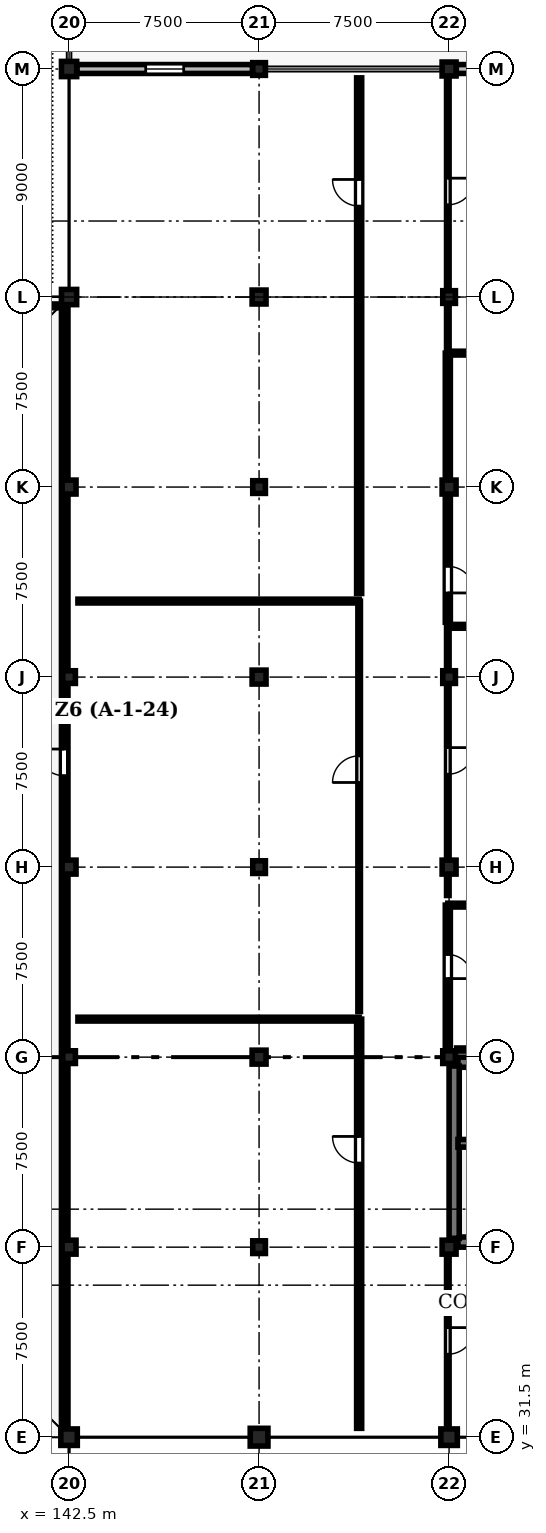
"""IFC4 building model, lengths in metres.
Left out: names, types, materials, properties, quantities, classifications, styles, units other than length and angle.
Written with IfcOpenShell. Run it as: python <this file> out.ifc"""

import sys

from ifc_helpers import new_model, si_unit, direction, frame, frame_2d, origin, origin_2d, place, context, subcontext, project, spatial, rectangle, circle, extrude, element, fill, save


model = new_model("IFC4")
c1 = context("Model", 3, precision=1e-05, world=origin(), true_north=direction((0.0, 1.0)))
c2 = subcontext(c1, "Body", "Model", "MODEL_VIEW")
j1 = project(units=[si_unit("LENGTHUNIT", "METRE"), si_unit("PLANEANGLEUNIT", "RADIAN")], contexts=[c1])
p1 = place(None, origin())
s1 = spatial("IfcSite", under=j1, at=p1, CompositionType="ELEMENT")
p2 = place(p1, origin())
s2 = spatial("IfcBuilding", under=s1, at=p2, CompositionType="ELEMENT")
p3 = place(p2, frame((0.0, 0.0, 4.8)))
s3 = spatial("IfcBuildingStorey", under=s2, at=p3, CompositionType="ELEMENT", Elevation=4.8)
p4 = place(p3, frame((142.5, 31.5, 0.0), z_axis=(0.0, 0.0, 1.0), x_axis=(1.0, 0.0, 0.0)))
e1 = element("IfcColumn", 1, at=p4, inside=s3, PredefinedType="COLUMN", context=c2, shape_type="SweptSolid", body=[
    extrude(rectangle(XDim=0.65, YDim=0.65, at=origin_2d()), origin(), (0.0, 0.0, 1.0), 4.5),
])
p5 = place(p3, frame((142.5, 39.0, 0.0), z_axis=(0.0, 0.0, 1.0), x_axis=(1.0, 0.0, 0.0)))
e2 = element("IfcColumn", 2, at=p5, inside=s3, PredefinedType="COLUMN", context=c2, shape_type="SweptSolid", body=[
    extrude(rectangle(XDim=0.55, YDim=0.55, at=origin_2d()), origin(), (0.0, 0.0, 1.0), 4.5),
])
p6 = place(p3, frame((142.5, 46.5, 0.0), z_axis=(0.0, 0.0, 1.0), x_axis=(1.0, 0.0, 0.0)))
e3 = element("IfcColumn", 3, at=p6, inside=s3, PredefinedType="COLUMN", context=c2, shape_type="SweptSolid", body=[
    extrude(rectangle(XDim=0.5, YDim=0.5, at=origin_2d()), origin(), (0.0, 0.0, 1.0), 4.5),
])
p7 = place(p3, frame((142.5, 54.0, 0.0), z_axis=(0.0, 0.0, 1.0), x_axis=(1.0, 0.0, 0.0)))
e4 = element("IfcColumn", 4, at=p7, inside=s3, PredefinedType="COLUMN", context=c2, shape_type="SweptSolid", body=[
    extrude(rectangle(XDim=0.55, YDim=0.55, at=origin_2d()), origin(), (0.0, 0.0, 1.0), 4.5),
])
p8 = place(p3, frame((142.5, 61.5, 0.0), z_axis=(0.0, 0.0, 1.0), x_axis=(1.0, 0.0, 0.0)))
e5 = element("IfcColumn", 5, at=p8, inside=s3, PredefinedType="COLUMN", context=c2, shape_type="SweptSolid", body=[
    extrude(rectangle(XDim=0.5, YDim=0.5, at=origin_2d()), origin(), (0.0, 0.0, 1.0), 4.5),
])
p9 = place(p3, frame((142.5, 69.0, 0.0), z_axis=(0.0, 0.0, 1.0), x_axis=(1.0, 0.0, 0.0)))
e6 = element("IfcColumn", 6, at=p9, inside=s3, PredefinedType="COLUMN", context=c2, shape_type="SweptSolid", body=[
    extrude(rectangle(XDim=0.55, YDim=0.55, at=origin_2d()), origin(), (0.0, 0.0, 1.0), 4.5),
])
p10 = place(p3, frame((142.5, 76.5, 0.0), z_axis=(0.0, 0.0, 1.0), x_axis=(1.0, 0.0, 0.0)))
e7 = element("IfcColumn", 7, at=p10, inside=s3, PredefinedType="COLUMN", context=c2, shape_type="SweptSolid", body=[
    extrude(rectangle(XDim=0.6, YDim=0.6, at=origin_2d()), origin(), (0.0, 0.0, 1.0), 4.5),
])
p11 = place(p3, frame((142.5, 85.5, 0.0), z_axis=(0.0, 0.0, 1.0), x_axis=(1.0, 0.0, 0.0)))
e8 = element("IfcColumn", 8, at=p11, inside=s3, PredefinedType="COLUMN", context=c2, shape_type="SweptSolid", body=[
    extrude(circle(Radius=0.3, at=origin_2d()), origin(), (0.0, 0.0, 1.0), 4.5),
])
p12 = place(p3, frame((150.0, 31.5, 0.0), z_axis=(0.0, 0.0, 1.0), x_axis=(1.0, 0.0, 0.0)))
e9 = element("IfcColumn", 9, at=p12, inside=s3, PredefinedType="COLUMN", context=c2, shape_type="SweptSolid", body=[
    extrude(rectangle(XDim=0.7, YDim=0.7, at=origin_2d()), origin(), (0.0, 0.0, 1.0), 4.5),
])
p13 = place(p3, frame((150.0, 39.0, 0.0), z_axis=(0.0, 0.0, 1.0), x_axis=(1.0, 0.0, 0.0)))
e10 = element("IfcColumn", 10, at=p13, inside=s3, PredefinedType="COLUMN", context=c2, shape_type="SweptSolid", body=[
    extrude(rectangle(XDim=0.5, YDim=0.5, at=origin_2d()), origin(), (0.0, 0.0, 1.0), 4.5),
])
p14 = place(p3, frame((150.0, 46.5, 0.0), z_axis=(0.0, 0.0, 1.0), x_axis=(1.0, 0.0, 0.0)))
e11 = element("IfcColumn", 11, at=p14, inside=s3, PredefinedType="COLUMN", context=c2, shape_type="SweptSolid", body=[
    extrude(rectangle(XDim=0.55, YDim=0.55, at=origin_2d()), origin(), (0.0, 0.0, 1.0), 4.5),
])
p15 = place(p3, frame((150.0, 54.0, 0.0), z_axis=(0.0, 0.0, 1.0), x_axis=(1.0, 0.0, 0.0)))
e12 = element("IfcColumn", 12, at=p15, inside=s3, PredefinedType="COLUMN", context=c2, shape_type="SweptSolid", body=[
    extrude(rectangle(XDim=0.5, YDim=0.5, at=origin_2d()), origin(), (0.0, 0.0, 1.0), 4.5),
])
p16 = place(p3, frame((150.0, 61.5, 0.0), z_axis=(0.0, 0.0, 1.0), x_axis=(1.0, 0.0, 0.0)))
e13 = element("IfcColumn", 13, at=p16, inside=s3, PredefinedType="COLUMN", context=c2, shape_type="SweptSolid", body=[
    extrude(rectangle(XDim=0.55, YDim=0.55, at=origin_2d()), origin(), (0.0, 0.0, 1.0), 4.5),
])
p17 = place(p3, frame((150.0, 69.0, 0.0), z_axis=(0.0, 0.0, 1.0), x_axis=(1.0, 0.0, 0.0)))
e14 = element("IfcColumn", 14, at=p17, inside=s3, PredefinedType="COLUMN", context=c2, shape_type="SweptSolid", body=[
    extrude(rectangle(XDim=0.5, YDim=0.5, at=origin_2d()), origin(), (0.0, 0.0, 1.0), 4.5),
])
p18 = place(p3, frame((150.0, 76.5, 0.0), z_axis=(0.0, 0.0, 1.0), x_axis=(1.0, 0.0, 0.0)))
e15 = element("IfcColumn", 15, at=p18, inside=s3, PredefinedType="COLUMN", context=c2, shape_type="SweptSolid", body=[
    extrude(rectangle(XDim=0.55, YDim=0.55, at=origin_2d()), origin(), (0.0, 0.0, 1.0), 4.5),
])
p19 = place(p3, frame((150.0, 85.5, 0.0), z_axis=(0.0, 0.0, 1.0), x_axis=(1.0, 0.0, 0.0)))
e16 = element("IfcColumn", 16, at=p19, inside=s3, PredefinedType="COLUMN", context=c2, shape_type="SweptSolid", body=[
    extrude(rectangle(XDim=0.5, YDim=0.5, at=origin_2d()), origin(), (0.0, 0.0, 1.0), 4.5),
])
p20 = place(p3, frame((157.5, 31.5, 0.0), z_axis=(0.0, 0.0, 1.0), x_axis=(1.0, 0.0, 0.0)))
e17 = element("IfcColumn", 17, at=p20, inside=s3, PredefinedType="COLUMN", context=c2, shape_type="SweptSolid", body=[
    extrude(rectangle(XDim=0.65, YDim=0.65, at=origin_2d()), origin(), (0.0, 0.0, 1.0), 4.5),
])
p21 = place(p3, frame((157.5, 39.0, 0.0), z_axis=(0.0, 0.0, 1.0), x_axis=(1.0, 0.0, 0.0)))
e18 = element("IfcColumn", 18, at=p21, inside=s3, PredefinedType="COLUMN", context=c2, shape_type="SweptSolid", body=[
    extrude(rectangle(XDim=0.55, YDim=0.55, at=origin_2d()), origin(), (0.0, 0.0, 1.0), 4.5),
])
p22 = place(p3, frame((157.5, 46.5, 0.0), z_axis=(0.0, 0.0, 1.0), x_axis=(1.0, 0.0, 0.0)))
e19 = element("IfcColumn", 19, at=p22, inside=s3, PredefinedType="COLUMN", context=c2, shape_type="SweptSolid", body=[
    extrude(rectangle(XDim=0.5, YDim=0.5, at=origin_2d()), origin(), (0.0, 0.0, 1.0), 4.5),
])
p23 = place(p3, frame((157.5, 54.0, 0.0), z_axis=(0.0, 0.0, 1.0), x_axis=(1.0, 0.0, 0.0)))
e20 = element("IfcColumn", 20, at=p23, inside=s3, PredefinedType="COLUMN", context=c2, shape_type="SweptSolid", body=[
    extrude(rectangle(XDim=0.55, YDim=0.55, at=origin_2d()), origin(), (0.0, 0.0, 1.0), 4.5),
])
p24 = place(p3, frame((157.5, 61.5, 0.0), z_axis=(0.0, 0.0, 1.0), x_axis=(1.0, 0.0, 0.0)))
e21 = element("IfcColumn", 21, at=p24, inside=s3, PredefinedType="COLUMN", context=c2, shape_type="SweptSolid", body=[
    extrude(rectangle(XDim=0.5, YDim=0.5, at=origin_2d()), origin(), (0.0, 0.0, 1.0), 4.5),
])
p25 = place(p3, frame((157.5, 69.0, 0.0), z_axis=(0.0, 0.0, 1.0), x_axis=(1.0, 0.0, 0.0)))
e22 = element("IfcColumn", 22, at=p25, inside=s3, PredefinedType="COLUMN", context=c2, shape_type="SweptSolid", body=[
    extrude(rectangle(XDim=0.55, YDim=0.55, at=origin_2d()), origin(), (0.0, 0.0, 1.0), 4.5),
])
p26 = place(p3, frame((157.5, 76.5, 0.0), z_axis=(0.0, 0.0, 1.0), x_axis=(1.0, 0.0, 0.0)))
e23 = element("IfcColumn", 23, at=p26, inside=s3, PredefinedType="COLUMN", context=c2, shape_type="SweptSolid", body=[
    extrude(rectangle(XDim=0.5, YDim=0.5, at=origin_2d()), origin(), (0.0, 0.0, 1.0), 4.5),
])
p27 = place(p3, frame((157.5, 85.5, 0.0), z_axis=(0.0, 0.0, 1.0), x_axis=(1.0, 0.0, 0.0)))
e24 = element("IfcColumn", 24, at=p27, inside=s3, PredefinedType="COLUMN", context=c2, shape_type="SweptSolid", body=[
    extrude(rectangle(XDim=0.55, YDim=0.55, at=origin_2d()), origin(), (0.0, 0.0, 1.0), 4.5),
])
p28 = place(p3, frame((142.81, 85.5, 0.0), z_axis=(0.0, 0.0, 1.0), x_axis=(1.0, 0.0, 0.0)))
e25 = element("IfcWall", 25, at=p28, inside=s3, PredefinedType="STANDARD", context=c2, shape_type="SweptSolid", body=[
    extrude(rectangle(XDim=6.93, YDim=0.35, at=frame_2d((3.465, 0.0))), origin(), (0.0, 0.0, 1.0), 3.63),
])
p29 = place(p28, frame((2.715, 0.0, 0.9)))
e26 = element("IfcOpeningElement", 26, at=p29, cuts=e25, PredefinedType="OPENING", context=c2, shape_type="SweptSolid", body=[
    extrude(rectangle(XDim=1.5, YDim=2.4, at=frame_2d((0.75, 1.2))), frame((0.0, 0.185, 0.0), z_axis=(0.0, -1.0, 0.0), x_axis=(1.0, 0.0, 0.0)), (0.0, 0.0, 1.0), 0.37),
])
p30 = place(p3, frame((157.785, 85.5, 0.0), z_axis=(0.0, 0.0, 1.0), x_axis=(1.0, 0.0, 0.0)))
e27 = element("IfcWall", 27, at=p30, inside=s3, PredefinedType="STANDARD", context=c2, shape_type="SweptSolid", body=[
    extrude(rectangle(XDim=6.955, YDim=0.35, at=frame_2d((3.478, 0.0))), origin(), (0.0, 0.0, 1.0), 3.63),
])
p31 = place(p30, frame((2.278, 0.0, 0.9)))
e28 = element("IfcOpeningElement", 28, at=p31, cuts=e27, PredefinedType="OPENING", context=c2, shape_type="SweptSolid", body=[
    extrude(rectangle(XDim=2.4, YDim=2.45, at=frame_2d((1.2, 1.225))), frame((0.0, 0.185, 0.0), z_axis=(0.0, -1.0, 0.0), x_axis=(1.0, 0.0, 0.0)), (0.0, 0.0, 1.0), 0.37),
])
p32 = place(p3, frame((157.85, 39.2, 0.0), z_axis=(0.0, 0.0, 1.0), x_axis=(1.0, 0.0, 0.0)))
e29 = element("IfcWall", 29, at=p32, inside=s3, PredefinedType="SHEAR", context=c2, shape_type="SweptSolid", body=[
    extrude(rectangle(XDim=8.05, YDim=0.4, at=frame_2d((4.025, 0.0))), origin(), (0.0, 0.0, 1.0), 4.18),
])
p33 = place(p3, frame((157.85, 46.3, 0.0), z_axis=(0.0, 0.0, 1.0), x_axis=(1.0, 0.0, 0.0)))
e30 = element("IfcWall", 30, at=p33, inside=s3, PredefinedType="SHEAR", context=c2, shape_type="SweptSolid", body=[
    extrude(rectangle(XDim=14.3, YDim=0.4, at=frame_2d((7.15, 0.0))), origin(), (0.0, 0.0, 1.0), 4.18),
])
p34 = place(p3, frame((157.7, 39.35, 0.0), z_axis=(0.0, 0.0, 1.0), x_axis=(0.0, 1.0, 0.0)))
e31 = element("IfcWall", 31, at=p34, inside=s3, PredefinedType="SHEAR", context=c2, shape_type="SweptSolid", body=[
    extrude(rectangle(XDim=6.8, YDim=0.4, at=frame_2d((3.4, 0.0))), origin(), (0.0, 0.0, 1.0), 4.18),
])
p35 = place(p3, frame((157.85, 43.1, 0.0), z_axis=(0.0, 0.0, 1.0), x_axis=(1.0, 0.0, 0.0)))
e32 = element("IfcWall", 32, at=p35, inside=s3, PredefinedType="SHEAR", context=c2, shape_type="SweptSolid", body=[
    extrude(rectangle(XDim=8.05, YDim=0.3, at=frame_2d((4.025, 0.0))), origin(), (0.0, 0.0, 1.0), 4.18),
])
p36 = place(p3, frame((142.3, 31.5, 0.0), z_axis=(0.0, 0.0, 1.0), x_axis=(0.0, 1.0, 0.0)))
e33 = element("IfcWall", 33, at=p36, inside=s3, PredefinedType="STANDARD", context=c2, shape_type="SweptSolid", body=[
    extrude(rectangle(XDim=44.65, YDim=0.2, at=frame_2d((22.325, 0.0))), origin(), (0.0, 0.0, 1.0), 3.615),
])
p37 = place(p36, frame((26.11, 0.0, 0.0)))
e34 = element("IfcOpeningElement", 34, at=p37, cuts=e33, PredefinedType="OPENING", context=c2, shape_type="SweptSolid", body=[
    extrude(rectangle(XDim=1.05, YDim=2.2, at=frame_2d((0.525, 1.1))), frame((0.0, 0.11, 0.0), z_axis=(0.0, -1.0, 0.0), x_axis=(1.0, 0.0, 0.0)), (0.0, 0.0, 1.0), 0.22),
])
p38 = place(p3, frame((153.95, 31.85, 0.0), z_axis=(0.0, 0.0, 1.0), x_axis=(0.0, 1.0, 0.0)))
e35 = element("IfcWall", 35, at=p38, inside=s3, PredefinedType="STANDARD", context=c2, shape_type="SweptSolid", body=[
    extrude(rectangle(XDim=16.15, YDim=0.2, at=frame_2d((8.075, 0.0))), origin(), (0.0, 0.0, 1.0), 3.765),
])
p39 = place(p38, frame((10.47, 0.0, 0.0)))
e36 = element("IfcOpeningElement", 36, at=p39, cuts=e35, PredefinedType="OPENING", context=c2, shape_type="SweptSolid", body=[
    extrude(rectangle(XDim=1.05, YDim=2.2, at=frame_2d((0.525, 1.1))), frame((0.0, 0.11, 0.0), z_axis=(0.0, -1.0, 0.0), x_axis=(1.0, 0.0, 0.0)), (0.0, 0.0, 1.0), 0.22),
])
p40 = place(p3, frame((153.95, 48.3, 0.0), z_axis=(0.0, 0.0, 1.0), x_axis=(0.0, 1.0, 0.0)))
e37 = element("IfcWall", 37, at=p40, inside=s3, PredefinedType="PARTITIONING", context=c2, shape_type="SweptSolid", body=[
    extrude(rectangle(XDim=16.2, YDim=0.1, at=frame_2d((8.1, 0.0))), origin(), (0.0, 0.0, 1.0), 3.765),
])
p41 = place(p40, frame((9.04, 0.0, 0.0)))
e38 = element("IfcOpeningElement", 38, at=p41, cuts=e37, PredefinedType="OPENING", context=c2, shape_type="SweptSolid", body=[
    extrude(rectangle(XDim=1.05, YDim=2.2, at=frame_2d((0.525, 1.1))), frame((0.0, 0.06, 0.0), z_axis=(0.0, -1.0, 0.0), x_axis=(1.0, 0.0, 0.0)), (0.0, 0.0, 1.0), 0.12),
])
p42 = place(p3, frame((153.95, 64.8, 0.0), z_axis=(0.0, 0.0, 1.0), x_axis=(0.0, 1.0, 0.0)))
e39 = element("IfcWall", 39, at=p42, inside=s3, PredefinedType="STANDARD", context=c2, shape_type="SweptSolid", body=[
    extrude(rectangle(XDim=20.35, YDim=0.2, at=frame_2d((10.175, 0.0))), origin(), (0.0, 0.0, 1.0), 3.765),
])
p43 = place(p42, frame((15.29, 0.0, 0.0)))
e40 = element("IfcOpeningElement", 40, at=p43, cuts=e39, PredefinedType="OPENING", context=c2, shape_type="SweptSolid", body=[
    extrude(rectangle(XDim=1.05, YDim=2.2, at=frame_2d((0.525, 1.1))), frame((0.0, 0.11, 0.0), z_axis=(0.0, -1.0, 0.0), x_axis=(1.0, 0.0, 0.0)), (0.0, 0.0, 1.0), 0.22),
])
p44 = place(p3, frame((157.45, 38.75, 0.0), z_axis=(0.0, 0.0, 1.0), x_axis=(0.0, -1.0, 0.0)))
e41 = element("IfcWall", 41, at=p44, inside=s3, PredefinedType="PARTITIONING", context=c2, shape_type="SweptSolid", body=[
    extrude(rectangle(XDim=6.9, YDim=0.1, at=frame_2d((3.45, 0.0))), origin(), (0.0, 0.0, 1.0), 3.565),
])
p45 = place(p44, frame((2.925, 0.0, 0.0)))
e42 = element("IfcOpeningElement", 42, at=p45, cuts=e41, PredefinedType="OPENING", context=c2, shape_type="SweptSolid", body=[
    extrude(rectangle(XDim=1.05, YDim=2.2, at=frame_2d((0.525, 1.1))), frame((0.0, 0.06, 0.0), z_axis=(0.0, -1.0, 0.0), x_axis=(1.0, 0.0, 0.0)), (0.0, 0.0, 1.0), 0.12),
])
p46 = place(p3, frame((157.45, 52.5, 0.0), z_axis=(0.0, 0.0, 1.0), x_axis=(0.0, -1.0, 0.0)))
e43 = element("IfcWall", 43, at=p46, inside=s3, PredefinedType="STANDARD", context=c2, shape_type="SweptSolid", body=[
    extrude(rectangle(XDim=5.7, YDim=0.2, at=frame_2d((2.85, 0.0))), origin(), (0.0, 0.0, 1.0), 3.565),
])
p47 = place(p46, frame((1.95, 0.0, 0.0)))
e44 = element("IfcOpeningElement", 44, at=p47, cuts=e43, PredefinedType="OPENING", context=c2, shape_type="SweptSolid", body=[
    extrude(rectangle(XDim=0.95, YDim=2.15, at=frame_2d((0.475, 1.075))), frame((0.0, 0.11, 0.0), z_axis=(0.0, -1.0, 0.0), x_axis=(1.0, 0.0, 0.0)), (0.0, 0.0, 1.0), 0.22),
])
p48 = place(p3, frame((157.45, 63.503, 0.0), z_axis=(0.0, 0.0, 1.0), x_axis=(0.0, -1.0, 0.0)))
e45 = element("IfcWall", 45, at=p48, inside=s3, PredefinedType="PARTITIONING", context=c2, shape_type="SweptSolid", body=[
    extrude(rectangle(XDim=10.624, YDim=0.1, at=frame_2d((5.312, 0.0))), origin(), (0.0, 0.0, 1.0), 3.565),
])
p49 = place(p48, frame((4.787, 0.0, 0.0)))
e46 = element("IfcOpeningElement", 46, at=p49, cuts=e45, PredefinedType="OPENING", context=c2, shape_type="SweptSolid", body=[
    extrude(rectangle(XDim=1.05, YDim=2.2, at=frame_2d((0.525, 1.1))), frame((0.0, 0.06, 0.0), z_axis=(0.0, -1.0, 0.0), x_axis=(1.0, 0.0, 0.0)), (0.0, 0.0, 1.0), 0.12),
])
p50 = place(p3, frame((157.45, 74.287, 0.0), z_axis=(0.0, 0.0, 1.0), x_axis=(0.0, -1.0, 0.0)))
e47 = element("IfcWall", 47, at=p50, inside=s3, PredefinedType="STANDARD", context=c2, shape_type="SweptSolid", body=[
    extrude(rectangle(XDim=10.623, YDim=0.2, at=frame_2d((5.312, 0.0))), origin(), (0.0, 0.0, 1.0), 3.565),
])
p51 = place(p50, frame((8.416, 0.0, 0.0)))
e48 = element("IfcOpeningElement", 48, at=p51, cuts=e47, PredefinedType="OPENING", context=c2, shape_type="SweptSolid", body=[
    extrude(rectangle(XDim=1.05, YDim=2.2, at=frame_2d((0.525, 1.1))), frame((0.0, 0.11, 0.0), z_axis=(0.0, -1.0, 0.0), x_axis=(1.0, 0.0, 0.0)), (0.0, 0.0, 1.0), 0.22),
])
p52 = place(p3, frame((157.45, 85.07, 0.0), z_axis=(0.0, 0.0, 1.0), x_axis=(0.0, -1.0, 0.0)))
e49 = element("IfcWall", 49, at=p52, inside=s3, PredefinedType="PARTITIONING", context=c2, shape_type="SweptSolid", body=[
    extrude(rectangle(XDim=10.623, YDim=0.1, at=frame_2d((5.312, 0.0))), origin(), (0.0, 0.0, 1.0), 3.465),
])
p53 = place(p52, frame((3.879, 0.0, 0.0)))
e50 = element("IfcOpeningElement", 50, at=p53, cuts=e49, PredefinedType="OPENING", context=c2, shape_type="SweptSolid", body=[
    extrude(rectangle(XDim=1.05, YDim=2.2, at=frame_2d((0.525, 1.1))), frame((0.0, 0.06, 0.0), z_axis=(0.0, -1.0, 0.0), x_axis=(1.0, 0.0, 0.0)), (0.0, 0.0, 1.0), 0.12),
])
p54 = place(p3, frame((135.35, 76.15, 0.0), z_axis=(0.0, 0.0, 1.0), x_axis=(1.0, 0.0, 0.0)))
e51 = element("IfcWall", 51, at=p54, inside=s3, PredefinedType="PARTITIONING", context=c2, shape_type="SweptSolid", body=[
    extrude(rectangle(XDim=6.95, YDim=0.15, at=frame_2d((3.475, 0.0))), origin(), (0.0, 0.0, 1.0), 3.615),
])
for number, where, z_axis, x_axis in (
    (52, (142.85, 48.0, 0.0), (0.0, 0.0, 1.0), (1.0, 0.0, 0.0)),
    (53, (142.85, 64.5, 0.0), (0.0, 0.0, 1.0), (1.0, 0.0, 0.0)),
):
    element("IfcWall", number, at=place(p3, frame(where, z_axis=z_axis, x_axis=x_axis)), inside=s3, PredefinedType="PARTITIONING", context=c2, shape_type="SweptSolid", body=[
        extrude(rectangle(XDim=11.1, YDim=0.15, at=frame_2d((5.55, 0.0))), origin(), (0.0, 0.0, 1.0), 4.165),
    ])
for number, where, z_axis, x_axis in (
    (54, (157.45, 52.5, 0.0), (0.0, 0.0, 1.0), (1.0, 0.0, 0.0)),
    (55, (157.45, 63.503, 0.0), (0.0, 0.0, 1.0), (1.0, 0.0, 0.0)),
    (56, (157.45, 74.287, 0.0), (0.0, 0.0, 1.0), (1.0, 0.0, 0.0)),
):
    element("IfcWall", number, at=place(p3, frame(where, z_axis=z_axis, x_axis=x_axis)), inside=s3, PredefinedType="PARTITIONING", context=c2, shape_type="SweptSolid", body=[
        extrude(rectangle(XDim=14.7, YDim=0.15, at=frame_2d((7.35, 0.0))), origin(), (0.0, 0.0, 1.0), 4.165),
    ])
p55 = place(p3, frame((157.8, 46.8, 0.0), z_axis=(0.0, 0.0, 1.0), x_axis=(1.0, 0.0, 0.0)))
e57 = element("IfcWall", 57, at=p55, inside=s3, PredefinedType="PARTITIONING", context=c2, shape_type="SweptSolid", body=[
    extrude(rectangle(XDim=14.35, YDim=0.12, at=frame_2d((7.175, 0.0))), origin(), (0.0, 0.0, 1.0), 3.515),
])
p56 = place(p29, origin())
e58 = element("IfcWindow", 58, at=p56, inside=s3, PartitioningType="SINGLE_PANEL", PredefinedType="WINDOW", context=c2, shape_type="SweptSolid", body=[
    extrude(rectangle(XDim=1.5, YDim=2.4, at=frame_2d((0.75, 1.2))), frame((0.0, 0.03, 0.0), z_axis=(0.0, -1.0, 0.0), x_axis=(1.0, 0.0, 0.0)), (0.0, 0.0, 1.0), 0.06),
])
fill(e26, e58)
p57 = place(p37, origin())
e59 = element("IfcDoor", 59, at=p57, inside=s3, OperationType="SINGLE_SWING_RIGHT", PredefinedType="DOOR", context=c2, shape_type="SweptSolid", body=[
    extrude(rectangle(XDim=1.05, YDim=2.2, at=frame_2d((0.525, 1.1))), frame((0.0, 0.025, 0.0), z_axis=(0.0, -1.0, 0.0), x_axis=(1.0, 0.0, 0.0)), (0.0, 0.0, 1.0), 0.05),
])
fill(e34, e59)
p58 = place(p39, origin())
e60 = element("IfcDoor", 60, at=p58, inside=s3, OperationType="SINGLE_SWING_RIGHT", PredefinedType="DOOR", context=c2, shape_type="SweptSolid", body=[
    extrude(rectangle(XDim=1.05, YDim=2.2, at=frame_2d((0.525, 1.1))), frame((0.0, 0.025, 0.0), z_axis=(0.0, -1.0, 0.0), x_axis=(1.0, 0.0, 0.0)), (0.0, 0.0, 1.0), 0.05),
])
fill(e36, e60)
p59 = place(p41, origin())
e61 = element("IfcDoor", 61, at=p59, inside=s3, OperationType="SINGLE_SWING_LEFT", PredefinedType="DOOR", context=c2, shape_type="SweptSolid", body=[
    extrude(rectangle(XDim=1.05, YDim=2.2, at=frame_2d((0.525, 1.1))), frame((0.0, 0.025, 0.0), z_axis=(0.0, -1.0, 0.0), x_axis=(1.0, 0.0, 0.0)), (0.0, 0.0, 1.0), 0.05),
])
fill(e38, e61)
p60 = place(p43, origin())
e62 = element("IfcDoor", 62, at=p60, inside=s3, OperationType="SINGLE_SWING_RIGHT", PredefinedType="DOOR", context=c2, shape_type="SweptSolid", body=[
    extrude(rectangle(XDim=1.05, YDim=2.2, at=frame_2d((0.525, 1.1))), frame((0.0, 0.025, 0.0), z_axis=(0.0, -1.0, 0.0), x_axis=(1.0, 0.0, 0.0)), (0.0, 0.0, 1.0), 0.05),
])
fill(e40, e62)
p61 = place(p45, origin())
e63 = element("IfcDoor", 63, at=p61, inside=s3, OperationType="SINGLE_SWING_LEFT", PredefinedType="DOOR", context=c2, shape_type="SweptSolid", body=[
    extrude(rectangle(XDim=1.05, YDim=2.2, at=frame_2d((0.525, 1.1))), frame((0.0, 0.025, 0.0), z_axis=(0.0, -1.0, 0.0), x_axis=(1.0, 0.0, 0.0)), (0.0, 0.0, 1.0), 0.05),
])
fill(e42, e63)
p62 = place(p47, origin())
e64 = element("IfcDoor", 64, at=p62, inside=s3, OperationType="SINGLE_SWING_RIGHT", PredefinedType="DOOR", context=c2, shape_type="SweptSolid", body=[
    extrude(rectangle(XDim=0.95, YDim=2.15, at=frame_2d((0.475, 1.075))), frame((0.0, 0.025, 0.0), z_axis=(0.0, -1.0, 0.0), x_axis=(1.0, 0.0, 0.0)), (0.0, 0.0, 1.0), 0.05),
])
fill(e44, e64)
p63 = place(p49, origin())
e65 = element("IfcDoor", 65, at=p63, inside=s3, OperationType="SINGLE_SWING_LEFT", PredefinedType="DOOR", context=c2, shape_type="SweptSolid", body=[
    extrude(rectangle(XDim=1.05, YDim=2.2, at=frame_2d((0.525, 1.1))), frame((0.0, 0.025, 0.0), z_axis=(0.0, -1.0, 0.0), x_axis=(1.0, 0.0, 0.0)), (0.0, 0.0, 1.0), 0.05),
])
fill(e46, e65)
p64 = place(p51, origin())
e66 = element("IfcDoor", 66, at=p64, inside=s3, OperationType="SINGLE_SWING_RIGHT", PredefinedType="DOOR", context=c2, shape_type="SweptSolid", body=[
    extrude(rectangle(XDim=1.05, YDim=2.2, at=frame_2d((0.525, 1.1))), frame((0.0, 0.025, 0.0), z_axis=(0.0, -1.0, 0.0), x_axis=(1.0, 0.0, 0.0)), (0.0, 0.0, 1.0), 0.05),
])
fill(e48, e66)
p65 = place(p53, origin())
e67 = element("IfcDoor", 67, at=p65, inside=s3, OperationType="SINGLE_SWING_LEFT", PredefinedType="DOOR", context=c2, shape_type="SweptSolid", body=[
    extrude(rectangle(XDim=1.05, YDim=2.2, at=frame_2d((0.525, 1.1))), frame((0.0, 0.025, 0.0), z_axis=(0.0, -1.0, 0.0), x_axis=(1.0, 0.0, 0.0)), (0.0, 0.0, 1.0), 0.05),
])
fill(e50, e67)
save(model, sys.argv[1])
